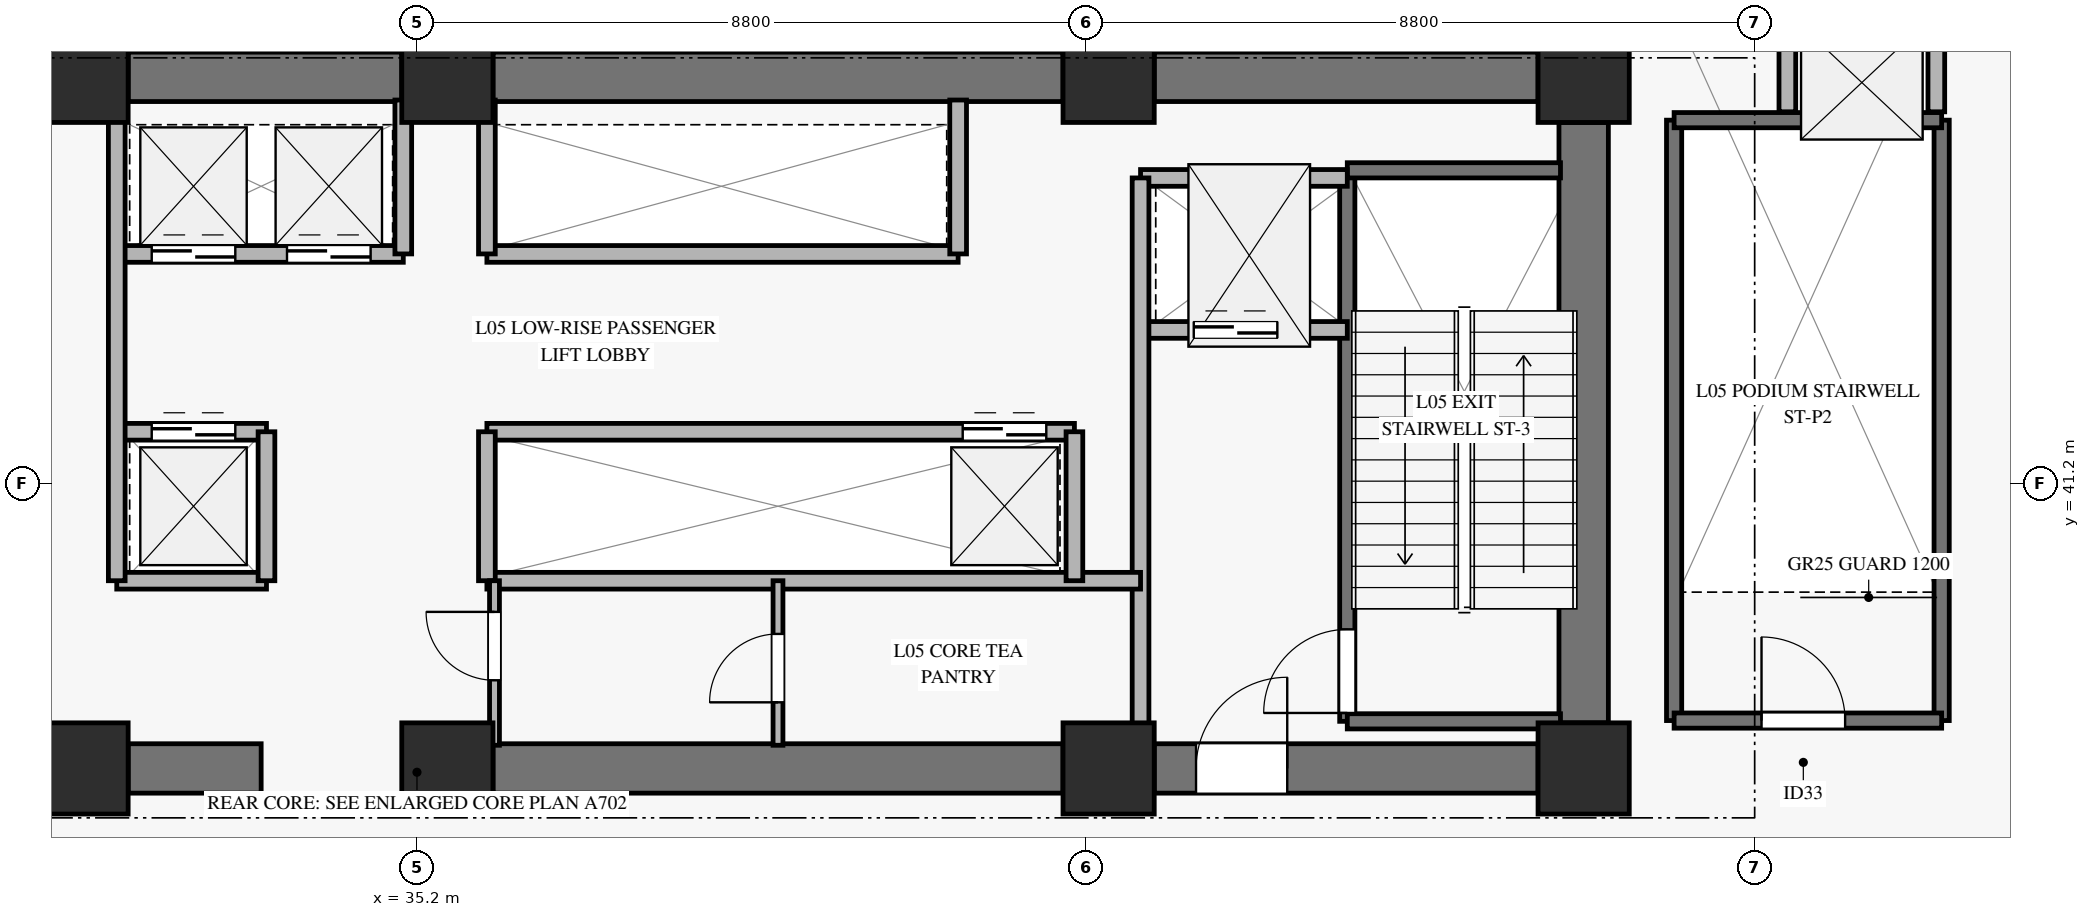
"""IFC4 building model, lengths in metres.
Left out: names, types, materials, properties, quantities, classifications, styles, units other than length and angle.
Written with IfcOpenShell. Run it as: python <this file> out.ifc"""

import sys

from ifc_helpers import new_model, si_unit, direction, frame, frame_2d, origin, origin_2d, place, context, subcontext, project, spatial, rectangle, extrude, source, transform, mapped, element, fill, save


model = new_model("IFC4")
c1 = context("Model", 3, precision=1e-05, world=origin(), true_north=direction((0.0, 1.0)))
c2 = subcontext(c1, "Body", "Model", "MODEL_VIEW")
j1 = project(units=[si_unit("LENGTHUNIT", "METRE"), si_unit("PLANEANGLEUNIT", "RADIAN")], contexts=[c1])
p1 = place(None, origin())
s1 = spatial("IfcSite", under=j1, at=p1, CompositionType="ELEMENT")
p2 = place(p1, origin())
s2 = spatial("IfcBuilding", under=s1, at=p2, CompositionType="ELEMENT")
p3 = place(p2, frame((0.0, 0.0, 20.2)))
s3 = spatial("IfcBuildingStorey", under=s2, at=p3, CompositionType="ELEMENT", Elevation=20.2)
m1 = source(origin(), c2, "Body", "SweptSolid", [
    extrude(rectangle(XDim=1.2, YDim=1.2, at=origin_2d()), origin(), (0.0, 0.0, 1.0), 4.98),
])
for number, where, z_axis, x_axis in (
    (1, (30.8, 37.45, 0.0), (0.0, 0.0, 1.0), (1.0, 0.0, 0.0)),
    (2, (30.8, 46.55, 0.0), (0.0, 0.0, 1.0), (1.0, 0.0, 0.0)),
    (3, (35.6, 37.45, 0.0), (0.0, 0.0, 1.0), (1.0, 0.0, 0.0)),
    (4, (35.6, 46.55, 0.0), (0.0, 0.0, 1.0), (1.0, 0.0, 0.0)),
    (5, (44.3, 37.45, 0.0), (0.0, 0.0, 1.0), (1.0, 0.0, 0.0)),
    (6, (44.3, 46.55, 0.0), (0.0, 0.0, 1.0), (1.0, 0.0, 0.0)),
    (7, (50.55, 37.45, 0.0), (0.0, 0.0, 1.0), (1.0, 0.0, 0.0)),
    (8, (50.55, 46.55, 0.0), (0.0, 0.0, 1.0), (1.0, 0.0, 0.0)),
):
    element("IfcColumn", number, at=place(p3, frame(where, z_axis=z_axis, x_axis=x_axis)), inside=s3, PredefinedType="PILASTER", context=c2, shape_type="MappedRepresentation", body=[
        mapped(m1, transform((0.0, 0.0, 0.0), x_axis=(1.0, 0.0, 0.0), y_axis=(0.0, 1.0, 0.0), z_axis=(0.0, 0.0, 1.0), scale=1.0)),
    ])
p4 = place(p3, frame((31.4, 46.55, 0.0), z_axis=(0.0, 0.0, 1.0), x_axis=(1.0, 0.0, 0.0)))
e9 = element("IfcWall", 9, at=p4, inside=s3, PredefinedType="SHEAR", context=c2, shape_type="SweptSolid", body=[
    extrude(rectangle(XDim=3.6, YDim=0.65, at=frame_2d((1.8, 0.0))), origin(), (0.0, 0.0, 1.0), 4.98),
])
p5 = place(p3, frame((36.2, 46.55, 0.0), z_axis=(0.0, 0.0, 1.0), x_axis=(1.0, 0.0, 0.0)))
e10 = element("IfcWall", 10, at=p5, inside=s3, PredefinedType="SHEAR", context=c2, shape_type="SweptSolid", body=[
    extrude(rectangle(XDim=7.5, YDim=0.65, at=frame_2d((3.75, 0.0))), origin(), (0.0, 0.0, 1.0), 4.98),
])
p6 = place(p3, frame((44.9, 46.55, 0.0), z_axis=(0.0, 0.0, 1.0), x_axis=(1.0, 0.0, 0.0)))
e11 = element("IfcWall", 11, at=p6, inside=s3, PredefinedType="SHEAR", context=c2, shape_type="SweptSolid", body=[
    extrude(rectangle(XDim=5.05, YDim=0.65, at=frame_2d((2.525, 0.0))), origin(), (0.0, 0.0, 1.0), 4.98),
])
p7 = place(p3, frame((31.4, 37.45, 0.0), z_axis=(0.0, 0.0, 1.0), x_axis=(1.0, 0.0, 0.0)))
e12 = element("IfcWall", 12, at=p7, inside=s3, PredefinedType="SHEAR", context=c2, shape_type="SweptSolid", body=[
    extrude(rectangle(XDim=1.75, YDim=0.65, at=frame_2d((0.875, 0.0))), origin(), (0.0, 0.0, 1.0), 4.98),
])
p8 = place(p3, frame((36.2, 37.45, 0.0), z_axis=(0.0, 0.0, 1.0), x_axis=(1.0, 0.0, 0.0)))
e13 = element("IfcWall", 13, at=p8, inside=s3, PredefinedType="SHEAR", context=c2, shape_type="SweptSolid", body=[
    extrude(rectangle(XDim=7.5, YDim=0.65, at=frame_2d((3.75, 0.0))), origin(), (0.0, 0.0, 1.0), 4.98),
])
p9 = place(p3, frame((44.9, 37.45, 0.0), z_axis=(0.0, 0.0, 1.0), x_axis=(1.0, 0.0, 0.0)))
e14 = element("IfcWall", 14, at=p9, inside=s3, PredefinedType="SHEAR", context=c2, shape_type="SweptSolid", body=[
    extrude(rectangle(XDim=5.05, YDim=0.65, at=frame_2d((2.525, 0.0))), origin(), (0.0, 0.0, 1.0), 4.98),
])
p10 = place(p9, frame((0.55, 0.0, 0.0)))
e15 = element("IfcOpeningElement", 15, at=p10, cuts=e14, PredefinedType="OPENING", context=c2, shape_type="SweptSolid", body=[
    extrude(rectangle(XDim=1.2, YDim=2.15, at=frame_2d((0.6, 1.075))), frame((0.0, 0.335, 0.0), z_axis=(0.0, -1.0, 0.0), x_axis=(1.0, 0.0, 0.0)), (0.0, 0.0, 1.0), 0.67),
])
p11 = place(p3, frame((50.55, 38.05, 0.0), z_axis=(0.0, 0.0, 1.0), x_axis=(0.0, 1.0, 0.0)))
e16 = element("IfcWall", 16, at=p11, inside=s3, PredefinedType="SHEAR", context=c2, shape_type="SweptSolid", body=[
    extrude(rectangle(XDim=7.9, YDim=0.65, at=frame_2d((3.95, 0.0))), origin(), (0.0, 0.0, 1.0), 4.98),
])
p12 = place(p3, frame((47.44, 38.07, 0.0), z_axis=(0.0, 0.0, 1.0), x_axis=(0.0, 1.0, 0.0)))
e17 = element("IfcWall", 17, at=p12, inside=s3, PredefinedType="SOLIDWALL", context=c2, shape_type="SweptSolid", body=[
    extrude(rectangle(XDim=7.25, YDim=0.2, at=frame_2d((3.625, 0.0))), origin(), (0.0, 0.0, 1.0), 5.2),
])
p13 = place(p12, frame((0.11, 0.0, 0.0)))
e18 = element("IfcOpeningElement", 18, at=p13, cuts=e17, PredefinedType="OPENING", context=c2, shape_type="SweptSolid", body=[
    extrude(rectangle(XDim=1.1, YDim=2.15, at=frame_2d((0.55, 1.075))), frame((0.0, 0.11, 0.0), z_axis=(0.0, -1.0, 0.0), x_axis=(1.0, 0.0, 0.0)), (0.0, 0.0, 1.0), 0.22),
])
for number, where, z_axis, x_axis in (
    (19, (47.44, 45.32, 0.0), (0.0, 0.0, 1.0), (1.0, 0.0, 0.0)),
    (20, (47.44, 38.07, 0.0), (0.0, 0.0, 1.0), (1.0, 0.0, 0.0)),
):
    element("IfcWall", number, at=place(p3, frame(where, z_axis=z_axis, x_axis=x_axis)), inside=s3, PredefinedType="SOLIDWALL", context=c2, shape_type="SweptSolid", body=[
        extrude(rectangle(XDim=2.805, YDim=0.2, at=frame_2d((1.403, 0.0))), origin(), (0.0, 0.0, 1.0), 5.2),
    ])
p14 = place(p3, frame((44.72, 43.22, 0.0), z_axis=(0.0, 0.0, 1.0), x_axis=(1.0, 0.0, 0.0)))
e21 = element("IfcWall", 21, at=p14, inside=s3, PredefinedType="SOLIDWALL", context=c2, shape_type="SweptSolid", body=[
    extrude(rectangle(XDim=2.72, YDim=0.22, at=frame_2d((1.36, 0.0))), origin(), (0.0, 0.0, 1.0), 4.98),
])
p15 = place(p14, frame((0.7, 0.0, 0.0)))
e22 = element("IfcOpeningElement", 22, at=p15, cuts=e21, PredefinedType="OPENING", context=c2, shape_type="SweptSolid", body=[
    extrude(rectangle(XDim=1.1, YDim=2.2, at=frame_2d((0.55, 1.1))), frame((0.0, 0.12, 0.0), z_axis=(0.0, -1.0, 0.0), x_axis=(1.0, 0.0, 0.0)), (0.0, 0.0, 1.0), 0.24),
])
p16 = place(p3, frame((44.72, 45.22, 0.0), z_axis=(0.0, 0.0, 1.0), x_axis=(1.0, 0.0, 0.0)))
e23 = element("IfcWall", 23, at=p16, inside=s3, PredefinedType="SOLIDWALL", context=c2, shape_type="SweptSolid", body=[
    extrude(rectangle(XDim=2.72, YDim=0.22, at=frame_2d((1.36, 0.0))), origin(), (0.0, 0.0, 1.0), 4.98),
])
p17 = place(p3, frame((44.72, 37.755, 0.0), z_axis=(0.0, 0.0, 1.0), x_axis=(0.0, 1.0, 0.0)))
e24 = element("IfcWall", 24, at=p17, inside=s3, PredefinedType="SOLIDWALL", context=c2, shape_type="SweptSolid", body=[
    extrude(rectangle(XDim=7.465, YDim=0.22, at=frame_2d((3.732, 0.0))), origin(), (0.0, 0.0, 1.0), 4.98),
])
for number, where, z_axis, x_axis in (
    (25, (51.74, 38.08, 0.0), (0.0, 0.0, 1.0), (0.0, 1.0, 0.0)),
    (26, (55.26, 38.08, 0.0), (0.0, 0.0, 1.0), (0.0, 1.0, 0.0)),
):
    element("IfcWall", number, at=place(p3, frame(where, z_axis=z_axis, x_axis=x_axis)), inside=s3, PredefinedType="SOLIDWALL", context=c2, shape_type="SweptSolid", body=[
        extrude(rectangle(XDim=7.9, YDim=0.2, at=frame_2d((3.95, 0.0))), origin(), (0.0, 0.0, 1.0), 5.2),
    ])
p18 = place(p3, frame((51.74, 45.98, 0.0), z_axis=(0.0, 0.0, 1.0), x_axis=(1.0, 0.0, 0.0)))
e27 = element("IfcWall", 27, at=p18, inside=s3, PredefinedType="SOLIDWALL", context=c2, shape_type="SweptSolid", body=[
    extrude(rectangle(XDim=3.52, YDim=0.2, at=frame_2d((1.76, 0.0))), origin(), (0.0, 0.0, 1.0), 5.2),
])
p19 = place(p3, frame((51.74, 38.08, 0.0), z_axis=(0.0, 0.0, 1.0), x_axis=(1.0, 0.0, 0.0)))
e28 = element("IfcWall", 28, at=p19, inside=s3, PredefinedType="SOLIDWALL", context=c2, shape_type="SweptSolid", body=[
    extrude(rectangle(XDim=3.52, YDim=0.2, at=frame_2d((1.76, 0.0))), origin(), (0.0, 0.0, 1.0), 5.2),
])
p20 = place(p19, frame((1.15, 0.0, 0.0)))
e29 = element("IfcOpeningElement", 29, at=p20, cuts=e28, PredefinedType="OPENING", context=c2, shape_type="SweptSolid", body=[
    extrude(rectangle(XDim=1.1, YDim=2.15, at=frame_2d((0.55, 1.075))), frame((0.0, 0.11, 0.0), z_axis=(0.0, -1.0, 0.0), x_axis=(1.0, 0.0, 0.0)), (0.0, 0.0, 1.0), 0.22),
])
for number, where, z_axis, x_axis in (
    (30, (53.23, 46.09, 0.0), (0.0, 0.0, 1.0), (0.0, 1.0, 0.0)),
    (31, (55.19, 46.09, 0.0), (0.0, 0.0, 1.0), (0.0, 1.0, 0.0)),
):
    element("IfcWall", number, at=place(p3, frame(where, z_axis=z_axis, x_axis=x_axis)), inside=s3, PredefinedType="SOLIDWALL", context=c2, shape_type="SweptSolid", body=[
        extrude(rectangle(XDim=1.29, YDim=0.22, at=frame_2d((0.645, 0.0))), origin(), (0.0, 0.0, 1.0), 4.98),
    ])
p21 = place(p3, frame((31.25, 44.22, 0.0), z_axis=(0.0, 0.0, 1.0), x_axis=(1.0, 0.0, 0.0)))
e32 = element("IfcWall", 32, at=p21, inside=s3, PredefinedType="SOLIDWALL", context=c2, shape_type="SweptSolid", body=[
    extrude(rectangle(XDim=3.77, YDim=0.22, at=frame_2d((1.885, 0.0))), origin(), (0.0, 0.0, 1.0), 4.98),
])
p22 = place(p21, frame((0.46, 0.0, 0.0)))
e33 = element("IfcOpeningElement", 33, at=p22, cuts=e32, PredefinedType="OPENING", context=c2, shape_type="SweptSolid", body=[
    extrude(rectangle(XDim=1.1, YDim=2.2, at=frame_2d((0.55, 1.1))), frame((0.0, 0.12, 0.0), z_axis=(0.0, -1.0, 0.0), x_axis=(1.0, 0.0, 0.0)), (0.0, 0.0, 1.0), 0.24),
])
p23 = place(p21, frame((2.24, 0.0, 0.0)))
e34 = element("IfcOpeningElement", 34, at=p23, cuts=e32, PredefinedType="OPENING", context=c2, shape_type="SweptSolid", body=[
    extrude(rectangle(XDim=1.1, YDim=2.2, at=frame_2d((0.55, 1.1))), frame((0.0, 0.12, 0.0), z_axis=(0.0, -1.0, 0.0), x_axis=(1.0, 0.0, 0.0)), (0.0, 0.0, 1.0), 0.24),
])
p24 = place(p3, frame((36.12, 44.22, 0.0), z_axis=(0.0, 0.0, 1.0), x_axis=(1.0, 0.0, 0.0)))
e35 = element("IfcWall", 35, at=p24, inside=s3, PredefinedType="SOLIDWALL", context=c2, shape_type="SweptSolid", body=[
    extrude(rectangle(XDim=6.2, YDim=0.22, at=frame_2d((3.1, 0.0))), origin(), (0.0, 0.0, 1.0), 4.98),
])
for number, where, z_axis, x_axis in (
    (36, (35.02, 44.22, 0.0), (0.0, 0.0, 1.0), (0.0, 1.0, 0.0)),
    (37, (36.12, 44.22, 0.0), (0.0, 0.0, 1.0), (0.0, 1.0, 0.0)),
    (38, (42.32, 44.22, 0.0), (0.0, 0.0, 1.0), (0.0, 1.0, 0.0)),
):
    element("IfcWall", number, at=place(p3, frame(where, z_axis=z_axis, x_axis=x_axis)), inside=s3, PredefinedType="SOLIDWALL", context=c2, shape_type="SweptSolid", body=[
        extrude(rectangle(XDim=2.025, YDim=0.22, at=frame_2d((1.013, 0.0))), origin(), (0.0, 0.0, 1.0), 4.98),
    ])
p25 = place(p3, frame((31.25, 41.88, 0.0), z_axis=(0.0, 0.0, 1.0), x_axis=(1.0, 0.0, 0.0)))
e39 = element("IfcWall", 39, at=p25, inside=s3, PredefinedType="SOLIDWALL", context=c2, shape_type="SweptSolid", body=[
    extrude(rectangle(XDim=1.97, YDim=0.22, at=frame_2d((0.985, 0.0))), origin(), (0.0, 0.0, 1.0), 4.98),
])
p26 = place(p25, frame((0.46, 0.0, 0.0)))
e40 = element("IfcOpeningElement", 40, at=p26, cuts=e39, PredefinedType="OPENING", context=c2, shape_type="SweptSolid", body=[
    extrude(rectangle(XDim=1.1, YDim=2.2, at=frame_2d((0.55, 1.1))), frame((0.0, 0.12, 0.0), z_axis=(0.0, -1.0, 0.0), x_axis=(1.0, 0.0, 0.0)), (0.0, 0.0, 1.0), 0.24),
])
p27 = place(p3, frame((36.12, 41.88, 0.0), z_axis=(0.0, 0.0, 1.0), x_axis=(1.0, 0.0, 0.0)))
e41 = element("IfcWall", 41, at=p27, inside=s3, PredefinedType="SOLIDWALL", context=c2, shape_type="SweptSolid", body=[
    extrude(rectangle(XDim=7.73, YDim=0.22, at=frame_2d((3.865, 0.0))), origin(), (0.0, 0.0, 1.0), 4.98),
])
p28 = place(p27, frame((6.26, 0.0, 0.0)))
e42 = element("IfcOpeningElement", 42, at=p28, cuts=e41, PredefinedType="OPENING", context=c2, shape_type="SweptSolid", body=[
    extrude(rectangle(XDim=1.1, YDim=2.2, at=frame_2d((0.55, 1.1))), frame((0.0, 0.12, 0.0), z_axis=(0.0, -1.0, 0.0), x_axis=(1.0, 0.0, 0.0)), (0.0, 0.0, 1.0), 0.24),
])
p29 = place(p3, frame((31.25, 39.92, 0.0), z_axis=(0.0, 0.0, 1.0), x_axis=(1.0, 0.0, 0.0)))
e43 = element("IfcWall", 43, at=p29, inside=s3, PredefinedType="SOLIDWALL", context=c2, shape_type="SweptSolid", body=[
    extrude(rectangle(XDim=1.97, YDim=0.22, at=frame_2d((0.985, 0.0))), origin(), (0.0, 0.0, 1.0), 4.98),
])
p30 = place(p3, frame((33.22, 39.92, 0.0), z_axis=(0.0, 0.0, 1.0), x_axis=(0.0, 1.0, 0.0)))
e44 = element("IfcWall", 44, at=p30, inside=s3, PredefinedType="SOLIDWALL", context=c2, shape_type="SweptSolid", body=[
    extrude(rectangle(XDim=1.96, YDim=0.22, at=frame_2d((0.98, 0.0))), origin(), (0.0, 0.0, 1.0), 4.98),
])
p31 = place(p3, frame((36.12, 39.92, 0.0), z_axis=(0.0, 0.0, 1.0), x_axis=(1.0, 0.0, 0.0)))
e45 = element("IfcWall", 45, at=p31, inside=s3, PredefinedType="SOLIDWALL", context=c2, shape_type="SweptSolid", body=[
    extrude(rectangle(XDim=8.6, YDim=0.22, at=frame_2d((4.3, 0.0))), origin(), (0.0, 0.0, 1.0), 4.265),
])
p32 = place(p3, frame((36.12, 39.92, 0.0), z_axis=(0.0, 0.0, 1.0), x_axis=(0.0, 1.0, 0.0)))
e46 = element("IfcWall", 46, at=p32, inside=s3, PredefinedType="SOLIDWALL", context=c2, shape_type="SweptSolid", body=[
    extrude(rectangle(XDim=1.96, YDim=0.22, at=frame_2d((0.98, 0.0))), origin(), (0.0, 0.0, 1.0), 4.98),
])
p33 = place(p3, frame((31.25, 39.92, 0.0), z_axis=(0.0, 0.0, 1.0), x_axis=(0.0, 1.0, 0.0)))
e47 = element("IfcWall", 47, at=p33, inside=s3, PredefinedType="SOLIDWALL", context=c2, shape_type="SweptSolid", body=[
    extrude(rectangle(XDim=6.325, YDim=0.22, at=frame_2d((3.163, 0.0))), origin(), (0.0, 0.0, 1.0), 4.98),
])
p34 = place(p3, frame((43.85, 39.92, 0.0), z_axis=(0.0, 0.0, 1.0), x_axis=(0.0, 1.0, 0.0)))
e48 = element("IfcWall", 48, at=p34, inside=s3, PredefinedType="SOLIDWALL", context=c2, shape_type="SweptSolid", body=[
    extrude(rectangle(XDim=1.96, YDim=0.22, at=frame_2d((0.98, 0.0))), origin(), (0.0, 0.0, 1.0), 4.98),
])
p35 = place(p3, frame((36.22, 37.755, 0.0), z_axis=(0.0, 0.0, 1.0), x_axis=(0.0, 1.0, 0.0)))
e49 = element("IfcWall", 49, at=p35, inside=s3, PredefinedType="PARTITIONING", context=c2, shape_type="SweptSolid", body=[
    extrude(rectangle(XDim=2.165, YDim=0.13, at=frame_2d((1.083, 0.0))), origin(), (0.0, 0.0, 1.0), 4.98),
])
p36 = place(p35, frame((0.855, 0.0, 0.0)))
e50 = element("IfcOpeningElement", 50, at=p36, cuts=e49, PredefinedType="OPENING", context=c2, shape_type="SweptSolid", body=[
    extrude(rectangle(XDim=0.9, YDim=2.1, at=frame_2d((0.45, 1.05))), frame((0.0, 0.075, 0.0), z_axis=(0.0, -1.0, 0.0), x_axis=(1.0, 0.0, 0.0)), (0.0, 0.0, 1.0), 0.15),
])
p37 = place(p3, frame((39.95, 37.755, 0.0), z_axis=(0.0, 0.0, 1.0), x_axis=(0.0, 1.0, 0.0)))
e51 = element("IfcWall", 51, at=p37, inside=s3, PredefinedType="PARTITIONING", context=c2, shape_type="SweptSolid", body=[
    extrude(rectangle(XDim=2.165, YDim=0.13, at=frame_2d((1.083, 0.0))), origin(), (0.0, 0.0, 1.0), 4.98),
])
p38 = place(p37, frame((0.565, 0.0, 0.0)))
e52 = element("IfcOpeningElement", 52, at=p38, cuts=e51, PredefinedType="OPENING", context=c2, shape_type="SweptSolid", body=[
    extrude(rectangle(XDim=0.9, YDim=2.1, at=frame_2d((0.45, 1.05))), frame((0.0, 0.075, 0.0), z_axis=(0.0, -1.0, 0.0), x_axis=(1.0, 0.0, 0.0)), (0.0, 0.0, 1.0), 0.15),
])
m2 = source(origin(), c2, "Body", "SweptSolid", [
    extrude(rectangle(XDim=1.1, YDim=2.15, at=frame_2d((0.55, 1.075))), frame((0.0, 0.025, 0.0), z_axis=(0.0, -1.0, 0.0), x_axis=(1.0, 0.0, 0.0)), (0.0, 0.0, 1.0), 0.05),
])
p39 = place(p13, origin())
e53 = element("IfcDoor", 53, at=p39, inside=s3, OperationType="SINGLE_SWING_LEFT", PredefinedType="DOOR", context=c2, shape_type="MappedRepresentation", body=[
    mapped(m2, transform((0.0, 0.0, 0.0), x_axis=(1.0, 0.0, 0.0), y_axis=(0.0, 1.0, 0.0), z_axis=(0.0, 0.0, 1.0), scale=1.0)),
])
fill(e18, e53)
m3 = source(origin(), c2, "Body", "SweptSolid", [
    extrude(rectangle(XDim=1.1, YDim=2.2, at=frame_2d((0.55, 1.1))), frame((0.0, 0.025, 0.0), z_axis=(0.0, -1.0, 0.0), x_axis=(1.0, 0.0, 0.0)), (0.0, 0.0, 1.0), 0.05),
])
p40 = place(p15, origin())
e54 = element("IfcDoor", 54, at=p40, inside=s3, OperationType="SLIDING_TO_LEFT", PredefinedType="DOOR", context=c2, shape_type="MappedRepresentation", body=[
    mapped(m3, transform((0.0, 0.0, 0.0), x_axis=(1.0, 0.0, 0.0), y_axis=(0.0, 1.0, 0.0), z_axis=(0.0, 0.0, 1.0), scale=1.0)),
])
fill(e22, e54)
m4 = source(origin(), c2, "Body", "SweptSolid", [
    extrude(rectangle(XDim=1.2, YDim=2.15, at=frame_2d((0.6, 1.075))), frame((0.0, 0.025, 0.0), z_axis=(0.0, -1.0, 0.0), x_axis=(1.0, 0.0, 0.0)), (0.0, 0.0, 1.0), 0.05),
])
p41 = place(p10, origin())
e55 = element("IfcDoor", 55, at=p41, inside=s3, OperationType="SINGLE_SWING_RIGHT", PredefinedType="DOOR", context=c2, shape_type="MappedRepresentation", body=[
    mapped(m4, transform((0.0, 0.0, 0.0), x_axis=(1.0, 0.0, 0.0), y_axis=(0.0, 1.0, 0.0), z_axis=(0.0, 0.0, 1.0), scale=1.0)),
])
fill(e15, e55)
p42 = place(p20, origin())
e56 = element("IfcDoor", 56, at=p42, inside=s3, OperationType="SINGLE_SWING_LEFT", PredefinedType="DOOR", context=c2, shape_type="MappedRepresentation", body=[
    mapped(m2, transform((0.0, 0.0, 0.0), x_axis=(1.0, 0.0, 0.0), y_axis=(0.0, 1.0, 0.0), z_axis=(0.0, 0.0, 1.0), scale=1.0)),
])
fill(e29, e56)
p43 = place(p22, origin())
e57 = element("IfcDoor", 57, at=p43, inside=s3, OperationType="SLIDING_TO_LEFT", PredefinedType="DOOR", context=c2, shape_type="MappedRepresentation", body=[
    mapped(m3, transform((0.0, 0.0, 0.0), x_axis=(1.0, 0.0, 0.0), y_axis=(0.0, 1.0, 0.0), z_axis=(0.0, 0.0, 1.0), scale=1.0)),
])
fill(e33, e57)
p44 = place(p23, origin())
e58 = element("IfcDoor", 58, at=p44, inside=s3, OperationType="SLIDING_TO_LEFT", PredefinedType="DOOR", context=c2, shape_type="MappedRepresentation", body=[
    mapped(m3, transform((0.0, 0.0, 0.0), x_axis=(1.0, 0.0, 0.0), y_axis=(0.0, 1.0, 0.0), z_axis=(0.0, 0.0, 1.0), scale=1.0)),
])
fill(e34, e58)
p45 = place(p26, origin())
e59 = element("IfcDoor", 59, at=p45, inside=s3, OperationType="SLIDING_TO_LEFT", PredefinedType="DOOR", context=c2, shape_type="MappedRepresentation", body=[
    mapped(m3, transform((0.0, 0.0, 0.0), x_axis=(1.0, 0.0, 0.0), y_axis=(0.0, 1.0, 0.0), z_axis=(0.0, 0.0, 1.0), scale=1.0)),
])
fill(e40, e59)
p46 = place(p28, origin())
e60 = element("IfcDoor", 60, at=p46, inside=s3, OperationType="SLIDING_TO_LEFT", PredefinedType="DOOR", context=c2, shape_type="MappedRepresentation", body=[
    mapped(m3, transform((0.0, 0.0, 0.0), x_axis=(1.0, 0.0, 0.0), y_axis=(0.0, 1.0, 0.0), z_axis=(0.0, 0.0, 1.0), scale=1.0)),
])
fill(e42, e60)
m5 = source(origin(), c2, "Body", "SweptSolid", [
    extrude(rectangle(XDim=0.9, YDim=2.1, at=frame_2d((0.45, 1.05))), frame((0.0, 0.025, 0.0), z_axis=(0.0, -1.0, 0.0), x_axis=(1.0, 0.0, 0.0)), (0.0, 0.0, 1.0), 0.05),
])
p47 = place(p36, origin())
e61 = element("IfcDoor", 61, at=p47, inside=s3, OperationType="SINGLE_SWING_RIGHT", PredefinedType="DOOR", context=c2, shape_type="MappedRepresentation", body=[
    mapped(m5, transform((0.0, 0.0, 0.0), x_axis=(1.0, 0.0, 0.0), y_axis=(0.0, 1.0, 0.0), z_axis=(0.0, 0.0, 1.0), scale=1.0)),
])
fill(e50, e61)
p48 = place(p38, origin())
e62 = element("IfcDoor", 62, at=p48, inside=s3, OperationType="SINGLE_SWING_LEFT", PredefinedType="DOOR", context=c2, shape_type="MappedRepresentation", body=[
    mapped(m5, transform((0.0, 0.0, 0.0), x_axis=(1.0, 0.0, 0.0), y_axis=(0.0, 1.0, 0.0), z_axis=(0.0, 0.0, 1.0), scale=1.0)),
])
fill(e52, e62)
save(model, sys.argv[1])
